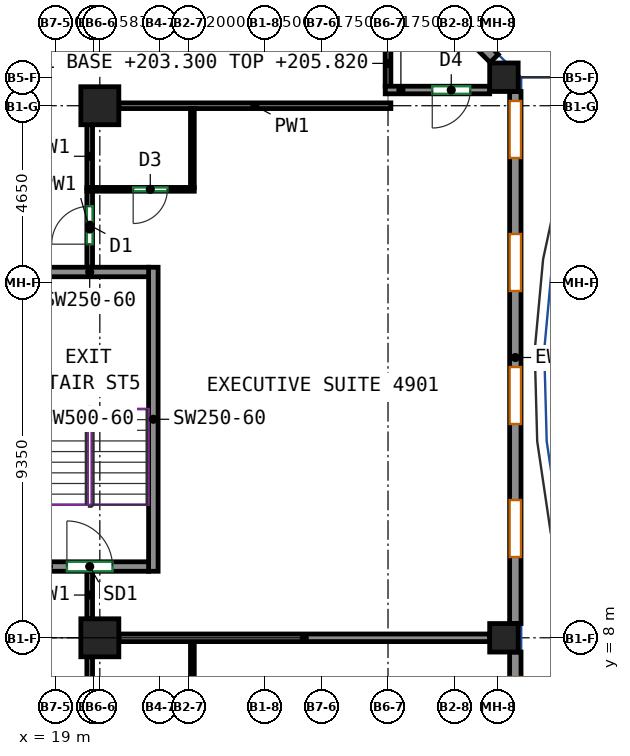
"""IFC4 building model, lengths in metres.
Left out: names, types, materials, properties, quantities, classifications, styles, units other than length and angle.
Written with IfcOpenShell. Run it as: python <this file> out.ifc"""

import sys

from ifc_helpers import new_model, si_unit, direction, frame, frame_2d, origin, origin_2d, place, context, subcontext, project, spatial, rectangle, extrude, source, transform, mapped, element, fill, save


model = new_model("IFC4")
c1 = context("Model", 3, precision=1e-05, world=origin(), true_north=direction((0.0, 1.0)))
c2 = subcontext(c1, "Body", "Model", "MODEL_VIEW")
j1 = project(units=[si_unit("LENGTHUNIT", "METRE"), si_unit("PLANEANGLEUNIT", "RADIAN")], contexts=[c1])
p1 = place(None, origin())
s1 = spatial("IfcSite", under=j1, at=p1, CompositionType="ELEMENT")
p2 = place(p1, origin())
s2 = spatial("IfcBuilding", under=s1, at=p2, CompositionType="ELEMENT")
p3 = place(p2, frame((0.0, 0.0, 203.3)))
s3 = spatial("IfcBuildingStorey", under=s2, at=p3, CompositionType="ELEMENT", Elevation=203.3)
m1 = source(origin(), c2, "Body", "SweptSolid", [
    extrude(rectangle(XDim=1.0, YDim=1.0, at=origin_2d()), origin(), (0.0, 0.0, 1.0), 3.12),
])
for number, where, z_axis, x_axis in (
    (1, (20.167, 8.0, 0.0), (0.0, 0.0, 1.0), (1.0, 0.0, 0.0)),
    (2, (20.167, 22.0, 0.0), (0.0, 0.0, 1.0), (1.0, 0.0, 0.0)),
):
    element("IfcColumn", number, at=place(p3, frame(where, z_axis=z_axis, x_axis=x_axis)), inside=s3, PredefinedType="COLUMN", context=c2, shape_type="MappedRepresentation", body=[
        mapped(m1, transform((0.0, 0.0, 0.0))),
    ])
m2 = source(origin(), c2, "Body", "SweptSolid", [
    extrude(rectangle(XDim=0.75, YDim=0.75, at=origin_2d()), origin(), (0.0, 0.0, 1.0), 3.12),
])
for number, where, z_axis, x_axis in (
    (3, (30.8, 8.0, 0.0), (0.0, 0.0, 1.0), (1.0, 0.0, 0.0)),
    (4, (30.8, 22.75, 0.0), (0.0, 0.0, 1.0), (1.0, 0.0, 0.0)),
):
    element("IfcColumn", number, at=place(p3, frame(where, z_axis=z_axis, x_axis=x_axis)), inside=s3, PredefinedType="COLUMN", context=c2, shape_type="MappedRepresentation", body=[
        mapped(m2, transform((0.0, 0.0, 0.0))),
    ])
m3 = source(origin(), c2, "Body", "SweptSolid", [
    extrude(rectangle(XDim=8.0, YDim=0.25, at=frame_2d((4.0, 0.0))), origin(), (0.0, 0.0, 1.0), 3.12),
])
p4 = place(p3, frame((21.575, 9.75, 0.0), z_axis=(0.0, 0.0, 1.0), x_axis=(0.0, 1.0, 0.0)))
e5 = element("IfcWall", 5, at=p4, inside=s3, PredefinedType="SHEAR", context=c2, shape_type="MappedRepresentation", body=[
    mapped(m3, transform((0.0, 0.0, 0.0))),
])
m4 = source(origin(), c2, "Body", "SweptSolid", [
    extrude(rectangle(XDim=3.1, YDim=0.25, at=frame_2d((1.55, 0.0))), origin(), (0.0, 0.0, 1.0), 3.12),
])
p5 = place(p3, frame((18.35, 9.875, 0.0), z_axis=(0.0, 0.0, 1.0), x_axis=(1.0, 0.0, 0.0)))
e6 = element("IfcWall", 6, at=p5, inside=s3, PredefinedType="SHEAR", context=c2, shape_type="MappedRepresentation", body=[
    mapped(m4, transform((0.0, 0.0, 0.0))),
])
p6 = place(p5, frame((0.95, 0.0, 0.0)))
e7 = element("IfcOpeningElement", 7, at=p6, cuts=e6, PredefinedType="OPENING", context=c2, shape_type="SweptSolid", body=[
    extrude(rectangle(XDim=1.2, YDim=2.1, at=frame_2d((0.6, 1.05))), frame((0.0, 0.135, 0.0), z_axis=(0.0, -1.0, 0.0), x_axis=(1.0, 0.0, 0.0)), (0.0, 0.0, 1.0), 0.27),
])
p7 = place(p3, frame((18.35, 17.625, 0.0), z_axis=(0.0, 0.0, 1.0), x_axis=(1.0, 0.0, 0.0)))
e8 = element("IfcWall", 8, at=p7, inside=s3, PredefinedType="SHEAR", context=c2, shape_type="MappedRepresentation", body=[
    mapped(m4, transform((0.0, 0.0, 0.0))),
])
m5 = source(origin(), c2, "Body", "SweptSolid", [
    extrude(rectangle(XDim=7.812, YDim=0.3, at=frame_2d((3.906, 0.0))), origin(), (0.0, 0.0, 1.0), 3.12),
])
p8 = place(p3, frame((31.1, -0.188, 0.0), z_axis=(0.0, 0.0, 1.0), x_axis=(0.0, 1.0, 0.0)))
e9 = element("IfcWall", 9, at=p8, inside=s3, PredefinedType="SOLIDWALL", context=c2, shape_type="MappedRepresentation", body=[
    mapped(m5, transform((0.0, 0.0, 0.0))),
])
p9 = place(p8, frame((1.75, 0.0, 0.85)))
e10 = element("IfcOpeningElement", 10, at=p9, cuts=e9, PredefinedType="OPENING", context=c2, shape_type="SweptSolid", body=[
    extrude(rectangle(XDim=1.5, YDim=1.95, at=frame_2d((0.75, 0.975))), frame((0.0, 0.16, 0.0), z_axis=(0.0, -1.0, 0.0), x_axis=(1.0, 0.0, 0.0)), (0.0, 0.0, 1.0), 0.32),
])
p10 = place(p8, frame((0.45, 0.0, 0.0)))
e11 = element("IfcOpeningElement", 11, at=p10, cuts=e9, PredefinedType="OPENING", context=c2, shape_type="SweptSolid", body=[
    extrude(rectangle(XDim=1.0, YDim=2.1, at=frame_2d((0.5, 1.05))), frame((0.0, 0.16, 0.0), z_axis=(0.0, -1.0, 0.0), x_axis=(1.0, 0.0, 0.0)), (0.0, 0.0, 1.0), 0.32),
])
p11 = place(p8, frame((5.656, 0.0, 0.85)))
e12 = element("IfcOpeningElement", 12, at=p11, cuts=e9, PredefinedType="OPENING", context=c2, shape_type="SweptSolid", body=[
    extrude(rectangle(XDim=1.5, YDim=1.95, at=frame_2d((0.75, 0.975))), frame((0.0, 0.16, 0.0), z_axis=(0.0, -1.0, 0.0), x_axis=(1.0, 0.0, 0.0)), (0.0, 0.0, 1.0), 0.32),
])
p12 = place(p8, frame((4.356, 0.0, 0.0)))
e13 = element("IfcOpeningElement", 13, at=p12, cuts=e9, PredefinedType="OPENING", context=c2, shape_type="SweptSolid", body=[
    extrude(rectangle(XDim=1.0, YDim=2.1, at=frame_2d((0.5, 1.05))), frame((0.0, 0.16, 0.0), z_axis=(0.0, -1.0, 0.0), x_axis=(1.0, 0.0, 0.0)), (0.0, 0.0, 1.0), 0.32),
])
m6 = source(origin(), c2, "Body", "SweptSolid", [
    extrude(rectangle(XDim=14.0, YDim=0.3, at=frame_2d((7.0, 0.0))), origin(), (0.0, 0.0, 1.0), 3.12),
])
p13 = place(p3, frame((31.1, 8.375, 0.0), z_axis=(0.0, 0.0, 1.0), x_axis=(0.0, 1.0, 0.0)))
e14 = element("IfcWall", 14, at=p13, inside=s3, PredefinedType="SOLIDWALL", context=c2, shape_type="MappedRepresentation", body=[
    mapped(m6, transform((0.0, 0.0, 0.0))),
])
p14 = place(p13, frame((1.75, 0.0, 0.85)))
e15 = element("IfcOpeningElement", 15, at=p14, cuts=e14, PredefinedType="OPENING", context=c2, shape_type="SweptSolid", body=[
    extrude(rectangle(XDim=1.5, YDim=1.95, at=frame_2d((0.75, 0.975))), frame((0.0, 0.16, 0.0), z_axis=(0.0, -1.0, 0.0), x_axis=(1.0, 0.0, 0.0)), (0.0, 0.0, 1.0), 0.32),
])
p15 = place(p13, frame((5.25, 0.0, 0.85)))
e16 = element("IfcOpeningElement", 16, at=p15, cuts=e14, PredefinedType="OPENING", context=c2, shape_type="SweptSolid", body=[
    extrude(rectangle(XDim=1.5, YDim=1.95, at=frame_2d((0.75, 0.975))), frame((0.0, 0.16, 0.0), z_axis=(0.0, -1.0, 0.0), x_axis=(1.0, 0.0, 0.0)), (0.0, 0.0, 1.0), 0.32),
])
p16 = place(p13, frame((8.75, 0.0, 0.85)))
e17 = element("IfcOpeningElement", 17, at=p16, cuts=e14, PredefinedType="OPENING", context=c2, shape_type="SweptSolid", body=[
    extrude(rectangle(XDim=1.5, YDim=1.95, at=frame_2d((0.75, 0.975))), frame((0.0, 0.16, 0.0), z_axis=(0.0, -1.0, 0.0), x_axis=(1.0, 0.0, 0.0)), (0.0, 0.0, 1.0), 0.32),
])
p17 = place(p13, frame((12.25, 0.0, 0.85)))
e18 = element("IfcOpeningElement", 18, at=p17, cuts=e14, PredefinedType="OPENING", context=c2, shape_type="SweptSolid", body=[
    extrude(rectangle(XDim=1.5, YDim=1.95, at=frame_2d((0.75, 0.975))), frame((0.0, 0.16, 0.0), z_axis=(0.0, -1.0, 0.0), x_axis=(1.0, 0.0, 0.0)), (0.0, 0.0, 1.0), 0.32),
])
m7 = source(origin(), c2, "Body", "SweptSolid", [
    extrude(rectangle(XDim=3.571, YDim=0.3, at=frame_2d((1.786, 0.0))), origin(), (0.0, 0.0, 1.0), 3.12),
])
p18 = place(p3, frame((30.544, 23.244, 0.0), z_axis=(0.0, 0.0, 1.0), x_axis=(-0.707140964879, 0.707072595841, 0.0)))
e19 = element("IfcWall", 19, at=p18, inside=s3, PredefinedType="SOLIDWALL", context=c2, shape_type="MappedRepresentation", body=[
    mapped(m7, transform((0.0, 0.0, 0.0))),
])
p19 = place(p18, frame((0.686, 0.0, 0.85)))
e20 = element("IfcOpeningElement", 20, at=p19, cuts=e19, PredefinedType="OPENING", context=c2, shape_type="SweptSolid", body=[
    extrude(rectangle(XDim=2.2, YDim=1.95, at=frame_2d((1.1, 0.975))), frame((0.0, 0.16, 0.0), z_axis=(0.0, -1.0, 0.0), x_axis=(1.0, 0.0, 0.0)), (0.0, 0.0, 1.0), 0.32),
])
p20 = place(p3, frame((19.9, 5.84, 0.0), z_axis=(0.0, 0.0, 1.0), x_axis=(0.0, 1.0, 0.0)))
e21 = element("IfcWall", 21, at=p20, inside=s3, PredefinedType="PARTITIONING", context=c2, shape_type="SweptSolid", body=[
    extrude(rectangle(XDim=1.66, YDim=0.15, at=frame_2d((0.83, 0.0))), origin(), (0.0, 0.0, 1.0), 2.52),
])
p21 = place(p3, frame((19.9, 17.75, 0.0), z_axis=(0.0, 0.0, 1.0), x_axis=(0.0, 1.0, 0.0)))
e22 = element("IfcWall", 22, at=p21, inside=s3, PredefinedType="PARTITIONING", context=c2, shape_type="SweptSolid", body=[
    extrude(rectangle(XDim=2.01, YDim=0.15, at=frame_2d((1.005, 0.0))), origin(), (0.0, 0.0, 1.0), 3.12),
])
p22 = place(p21, frame((0.607, 0.0, 0.0)))
e23 = element("IfcOpeningElement", 23, at=p22, cuts=e22, PredefinedType="OPENING", context=c2, shape_type="SweptSolid", body=[
    extrude(rectangle(XDim=1.0, YDim=2.1, at=frame_2d((0.5, 1.05))), frame((0.0, 0.085, 0.0), z_axis=(0.0, -1.0, 0.0), x_axis=(1.0, 0.0, 0.0)), (0.0, 0.0, 1.0), 0.17),
])
p23 = place(p3, frame((19.9, 8.5, 0.0), z_axis=(0.0, 0.0, 1.0), x_axis=(0.0, 1.0, 0.0)))
e24 = element("IfcWall", 24, at=p23, inside=s3, PredefinedType="PARTITIONING", context=c2, shape_type="SweptSolid", body=[
    extrude(rectangle(XDim=1.25, YDim=0.15, at=frame_2d((0.625, 0.0))), origin(), (0.0, 0.0, 1.0), 3.12),
])
p24 = place(p3, frame((20.667, 22.0, 0.0), z_axis=(0.0, 0.0, 1.0), x_axis=(1.0, 0.0, 0.0)))
e25 = element("IfcWall", 25, at=p24, inside=s3, PredefinedType="PARTITIONING", context=c2, shape_type="SweptSolid", body=[
    extrude(rectangle(XDim=7.158, YDim=0.15, at=frame_2d((3.579, 0.0))), origin(), (0.0, 0.0, 1.0), 3.12),
])
p25 = place(p3, frame((19.9, 19.84, 0.0), z_axis=(0.0, 0.0, 1.0), x_axis=(0.0, 1.0, 0.0)))
e26 = element("IfcWall", 26, at=p25, inside=s3, PredefinedType="PARTITIONING", context=c2, shape_type="SweptSolid", body=[
    extrude(rectangle(XDim=1.66, YDim=0.15, at=frame_2d((0.83, 0.0))), origin(), (0.0, 0.0, 1.0), 3.12),
])
p26 = place(p3, frame((27.75, 22.503, 0.0), z_axis=(0.0, 0.0, 1.0), x_axis=(0.0, 1.0, 0.0)))
e27 = element("IfcWall", 27, at=p26, inside=s3, PredefinedType="PARTITIONING", context=c2, shape_type="SweptSolid", body=[
    extrude(rectangle(XDim=1.222, YDim=0.15, at=frame_2d((0.611, 0.0))), origin(), (0.0, 0.0, 1.0), 2.52),
])
p27 = place(p3, frame((22.602, 5.85, 0.0), z_axis=(0.0, 0.0, 1.0), x_axis=(0.0, 1.0, 0.0)))
e28 = element("IfcWall", 28, at=p27, inside=s3, PredefinedType="PARTITIONING", context=c2, shape_type="SweptSolid", body=[
    extrude(rectangle(XDim=2.05, YDim=0.1, at=frame_2d((1.025, 0.0))), origin(), (0.0, 0.0, 1.0), 3.12),
])
p28 = place(p3, frame((20.667, 8.0, 0.0), z_axis=(0.0, 0.0, 1.0), x_axis=(1.0, 0.0, 0.0)))
e29 = element("IfcWall", 29, at=p28, inside=s3, PredefinedType="PARTITIONING", context=c2, shape_type="SweptSolid", body=[
    extrude(rectangle(XDim=9.758, YDim=0.2, at=frame_2d((4.879, 0.0))), origin(), (0.0, 0.0, 1.0), 2.52),
])
p29 = place(p3, frame((22.652, 19.8, 0.0), z_axis=(0.0, 0.0, 1.0), x_axis=(-1.0, 0.0, 0.0)))
e30 = element("IfcWall", 30, at=p29, inside=s3, PredefinedType="PARTITIONING", context=c2, shape_type="SweptSolid", body=[
    extrude(rectangle(XDim=2.825, YDim=0.1, at=frame_2d((1.413, 0.0))), origin(), (0.0, 0.0, 1.0), 3.12),
])
p30 = place(p29, frame((0.708, 0.0, 0.0)))
e31 = element("IfcOpeningElement", 31, at=p30, cuts=e30, PredefinedType="OPENING", context=c2, shape_type="SweptSolid", body=[
    extrude(rectangle(XDim=0.9, YDim=2.1, at=frame_2d((0.45, 1.05))), frame((0.0, 0.06, 0.0), z_axis=(0.0, -1.0, 0.0), x_axis=(1.0, 0.0, 0.0)), (0.0, 0.0, 1.0), 0.12),
])
p31 = place(p3, frame((22.602, 19.85, 0.0), z_axis=(0.0, 0.0, 1.0), x_axis=(0.0, 1.0, 0.0)))
e32 = element("IfcWall", 32, at=p31, inside=s3, PredefinedType="PARTITIONING", context=c2, shape_type="SweptSolid", body=[
    extrude(rectangle(XDim=2.073, YDim=0.1, at=frame_2d((1.037, 0.0))), origin(), (0.0, 0.0, 1.0), 3.12),
])
p32 = place(p3, frame((30.425, 22.413, 0.0), z_axis=(0.0, 0.0, 1.0), x_axis=(-1.0, 0.0, 0.0)))
e33 = element("IfcWall", 33, at=p32, inside=s3, PredefinedType="PARTITIONING", context=c2, shape_type="SweptSolid", body=[
    extrude(rectangle(XDim=2.748, YDim=0.2, at=frame_2d((1.374, 0.0))), origin(), (0.0, 0.0, 1.0), 2.52),
])
p33 = place(p32, frame((0.511, 0.0, 0.0)))
e34 = element("IfcOpeningElement", 34, at=p33, cuts=e33, PredefinedType="OPENING", context=c2, shape_type="SweptSolid", body=[
    extrude(rectangle(XDim=1.0, YDim=2.1, at=frame_2d((0.5, 1.05))), frame((0.0, 0.11, 0.0), z_axis=(0.0, -1.0, 0.0), x_axis=(1.0, 0.0, 0.0)), (0.0, 0.0, 1.0), 0.22),
])
p34 = place(p14, origin())
e35 = element("IfcWindow", 35, at=p34, inside=s3, PartitioningType="SINGLE_PANEL", PredefinedType="WINDOW", context=c2, shape_type="SweptSolid", body=[
    extrude(rectangle(XDim=1.5, YDim=1.95, at=frame_2d((0.75, 0.975))), frame((0.0, 0.03, 0.0), z_axis=(0.0, -1.0, 0.0), x_axis=(1.0, 0.0, 0.0)), (0.0, 0.0, 1.0), 0.06),
])
fill(e15, e35)
p35 = place(p15, origin())
e36 = element("IfcWindow", 36, at=p35, inside=s3, PartitioningType="SINGLE_PANEL", PredefinedType="WINDOW", context=c2, shape_type="SweptSolid", body=[
    extrude(rectangle(XDim=1.5, YDim=1.95, at=frame_2d((0.75, 0.975))), frame((0.0, 0.03, 0.0), z_axis=(0.0, -1.0, 0.0), x_axis=(1.0, 0.0, 0.0)), (0.0, 0.0, 1.0), 0.06),
])
fill(e16, e36)
p36 = place(p16, origin())
e37 = element("IfcWindow", 37, at=p36, inside=s3, PartitioningType="SINGLE_PANEL", PredefinedType="WINDOW", context=c2, shape_type="SweptSolid", body=[
    extrude(rectangle(XDim=1.5, YDim=1.95, at=frame_2d((0.75, 0.975))), frame((0.0, 0.03, 0.0), z_axis=(0.0, -1.0, 0.0), x_axis=(1.0, 0.0, 0.0)), (0.0, 0.0, 1.0), 0.06),
])
fill(e17, e37)
p37 = place(p17, origin())
e38 = element("IfcWindow", 38, at=p37, inside=s3, PartitioningType="SINGLE_PANEL", PredefinedType="WINDOW", context=c2, shape_type="SweptSolid", body=[
    extrude(rectangle(XDim=1.5, YDim=1.95, at=frame_2d((0.75, 0.975))), frame((0.0, 0.03, 0.0), z_axis=(0.0, -1.0, 0.0), x_axis=(1.0, 0.0, 0.0)), (0.0, 0.0, 1.0), 0.06),
])
fill(e18, e38)
p38 = place(p6, origin())
e39 = element("IfcDoor", 39, at=p38, inside=s3, OperationType="DOUBLE_DOOR_SINGLE_SWING", PredefinedType="DOOR", context=c2, shape_type="SweptSolid", body=[
    extrude(rectangle(XDim=1.2, YDim=2.1, at=frame_2d((0.6, 1.05))), frame((0.0, 0.025, 0.0), z_axis=(0.0, -1.0, 0.0), x_axis=(1.0, 0.0, 0.0)), (0.0, 0.0, 1.0), 0.05),
])
fill(e7, e39)
p39 = place(p22, origin())
e40 = element("IfcDoor", 40, at=p39, inside=s3, OperationType="SINGLE_SWING_LEFT", PredefinedType="DOOR", context=c2, shape_type="SweptSolid", body=[
    extrude(rectangle(XDim=1.0, YDim=2.1, at=frame_2d((0.5, 1.05))), frame((0.0, 0.025, 0.0), z_axis=(0.0, -1.0, 0.0), x_axis=(1.0, 0.0, 0.0)), (0.0, 0.0, 1.0), 0.05),
])
fill(e23, e40)
p40 = place(p30, origin())
e41 = element("IfcDoor", 41, at=p40, inside=s3, OperationType="SINGLE_SWING_RIGHT", PredefinedType="DOOR", context=c2, shape_type="SweptSolid", body=[
    extrude(rectangle(XDim=0.9, YDim=2.1, at=frame_2d((0.45, 1.05))), frame((0.0, 0.025, 0.0), z_axis=(0.0, -1.0, 0.0), x_axis=(1.0, 0.0, 0.0)), (0.0, 0.0, 1.0), 0.05),
])
fill(e31, e41)
p41 = place(p33, origin())
e42 = element("IfcDoor", 42, at=p41, inside=s3, OperationType="SINGLE_SWING_RIGHT", PredefinedType="DOOR", context=c2, shape_type="SweptSolid", body=[
    extrude(rectangle(XDim=1.0, YDim=2.1, at=frame_2d((0.5, 1.05))), frame((0.0, 0.025, 0.0), z_axis=(0.0, -1.0, 0.0), x_axis=(1.0, 0.0, 0.0)), (0.0, 0.0, 1.0), 0.05),
])
fill(e34, e42)
save(model, sys.argv[1])
